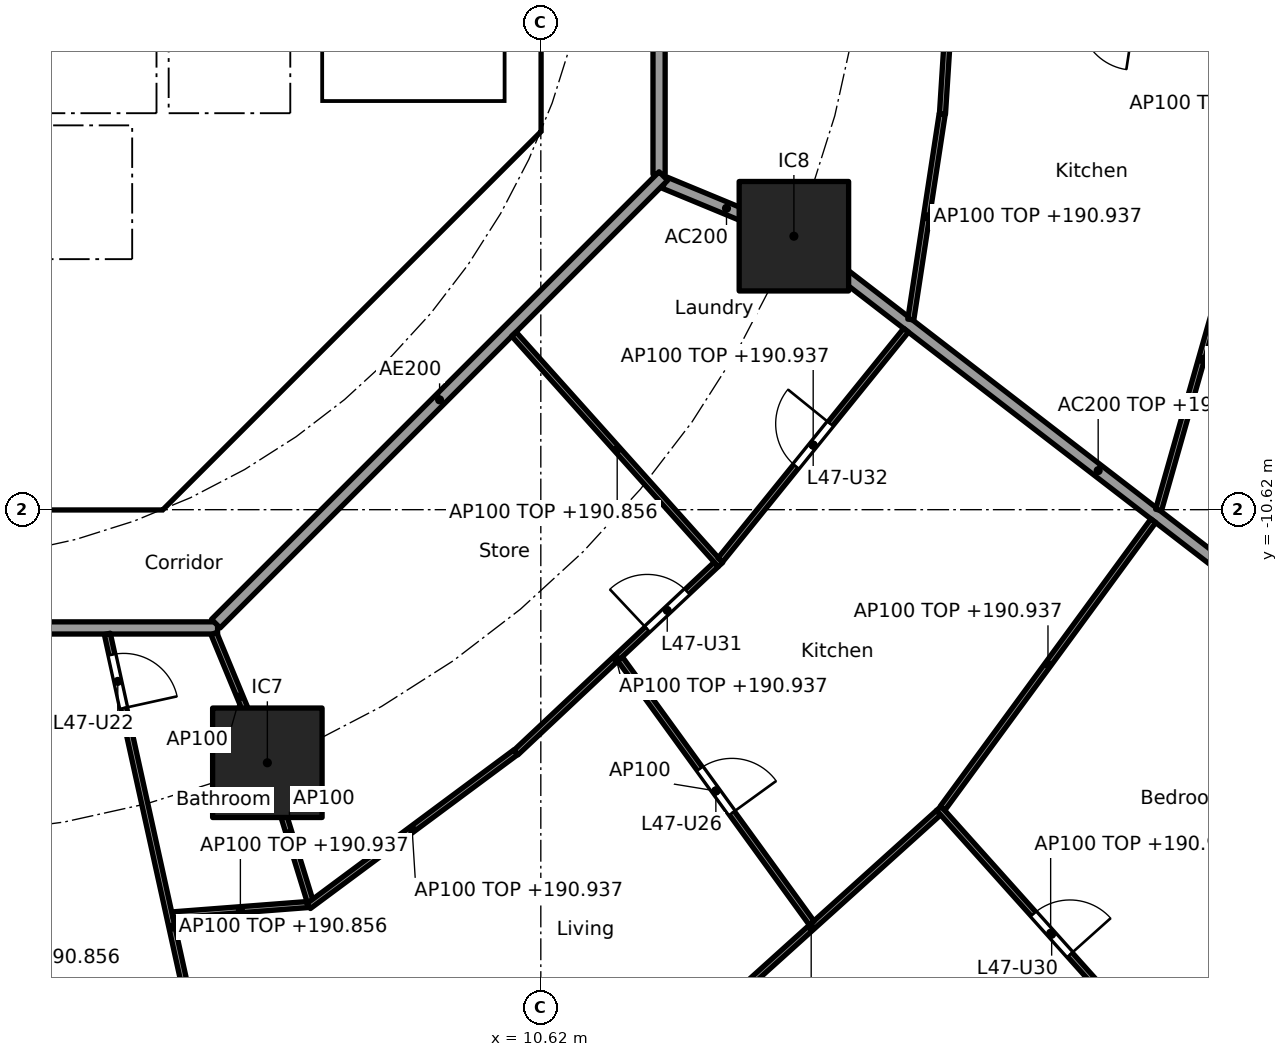
"""IFC4 building model, lengths in metres.
Left out: names, types, materials, properties, quantities, classifications, styles, units other than length and angle.
Written with IfcOpenShell. Run it as: python <this file> out.ifc"""

import sys

from ifc_helpers import new_model, si_unit, direction, frame, frame_2d, origin, origin_2d, place, context, subcontext, project, spatial, polyline, rectangle, outline, extrude, element, fill, save


model = new_model("IFC4")
c1 = context("Model", 3, precision=1e-05, world=origin(), true_north=direction((0.0, 1.0)))
c2 = subcontext(c1, "Body", "Model", "MODEL_VIEW")
j1 = project(units=[si_unit("LENGTHUNIT", "METRE"), si_unit("PLANEANGLEUNIT", "RADIAN")], contexts=[c1])
p1 = place(None, origin())
s1 = spatial("IfcSite", under=j1, at=p1, CompositionType="ELEMENT")
p2 = place(p1, origin())
s2 = spatial("IfcBuilding", under=s1, at=p2, CompositionType="ELEMENT")
p3 = place(p2, frame((0.0, 0.0, 188.1)))
s3 = spatial("IfcBuildingStorey", under=s2, at=p3, CompositionType="ELEMENT", Elevation=188.1)
for number, where, z_axis, x_axis in (
    (1, (6.123, -14.782, 0.0), (0.0, 0.0, 1.0), (1.0, 0.0, 0.0)),
    (2, (14.782, -6.123, 0.0), (0.0, 0.0, 1.0), (1.0, 0.0, 0.0)),
):
    element("IfcColumn", number, at=place(p3, frame(where, z_axis=z_axis, x_axis=x_axis)), inside=s3, PredefinedType="COLUMN", context=c2, shape_type="SweptSolid", body=[
        extrude(rectangle(XDim=1.8, YDim=1.8, at=origin_2d()), origin(), (0.0, 0.0, 1.0), 3.7),
    ])
p4 = place(p3, frame((4.613, -9.988, 0.0), z_axis=(0.0, 0.0, 1.0), x_axis=(0.707106781187, 0.707106781187, 0.0)))
e3 = element("IfcWall", 3, at=p4, inside=s3, PredefinedType="SHEAR", context=c2, shape_type="SweptSolid", body=[
    extrude(rectangle(XDim=7.602, YDim=0.6, at=frame_2d((3.801, 0.0))), origin(), (0.0, 0.0, 1.0), 3.44),
])
p5 = place(p4, frame((3.201, 0.0, 0.0)))
e4 = element("IfcOpeningElement", 4, at=p5, cuts=e3, PredefinedType="OPENING", context=c2, shape_type="SweptSolid", body=[
    extrude(rectangle(XDim=1.2, YDim=2.1, at=frame_2d((0.6, 1.05))), frame((0.0, 0.31, 0.0), z_axis=(0.0, -1.0, 0.0), x_axis=(1.0, 0.0, 0.0)), (0.0, 0.0, 1.0), 0.62),
])
p6 = place(p3, frame((4.0, -10.025, 0.0), z_axis=(0.0, 0.0, 1.0), x_axis=(0.0, 1.0, 0.0)))
e5 = element("IfcWall", 5, at=p6, inside=s3, PredefinedType="SOLIDWALL", context=c2, shape_type="SweptSolid", body=[
    extrude(rectangle(XDim=3.0, YDim=0.2, at=frame_2d((1.5, 0.0))), origin(), (0.0, 0.0, 1.0), 3.44),
])
p7 = place(p6, frame((0.975, 0.0, 0.0)))
e6 = element("IfcOpeningElement", 6, at=p7, cuts=e5, PredefinedType="OPENING", context=c2, shape_type="SweptSolid", body=[
    extrude(rectangle(XDim=1.1, YDim=2.1, at=frame_2d((0.55, 1.05))), frame((0.0, 0.11, 0.0), z_axis=(0.0, -1.0, 0.0), x_axis=(1.0, 0.0, 0.0)), (0.0, 0.0, 1.0), 0.22),
])
p8 = place(p3, frame((4.0, -6.5, 0.0), z_axis=(0.0, 0.0, 1.0), x_axis=(0.0, 1.0, 0.0)))
e7 = element("IfcWall", 7, at=p8, inside=s3, PredefinedType="SOLIDWALL", context=c2, shape_type="SweptSolid", body=[
    extrude(rectangle(XDim=2.2, YDim=0.2, at=frame_2d((1.1, 0.0))), origin(), (0.0, 0.0, 1.0), 3.44),
])
p9 = place(p8, frame((0.55, 0.0, 0.0)))
e8 = element("IfcOpeningElement", 8, at=p9, cuts=e7, PredefinedType="OPENING", context=c2, shape_type="SweptSolid", body=[
    extrude(rectangle(XDim=1.1, YDim=2.1, at=frame_2d((0.55, 1.05))), frame((0.0, 0.11, 0.0), z_axis=(0.0, -1.0, 0.0), x_axis=(1.0, 0.0, 0.0)), (0.0, 0.0, 1.0), 0.22),
])
p10 = place(p3, origin())
e9 = element("IfcWall", 9, at=p10, inside=s3, PredefinedType="SHEAR", context=c2, shape_type="SweptSolid", body=[
    extrude(outline(polyline([(-4.152, -10.025), (4.152, -10.025), (4.401, -9.776), (4.825, -10.2), (4.401, -10.625), (-4.401, -10.625), (-4.825, -10.2), (-4.401, -9.776), (-4.152, -10.025)])), origin(), (0.0, 0.0, 1.0), 3.44),
])
p11 = place(p3, origin())
e10 = element("IfcWall", 10, at=p11, inside=s3, PredefinedType="SHEAR", context=c2, shape_type="SweptSolid", body=[
    extrude(outline(polyline([(9.776, -4.401), (10.025, -4.152), (10.025, -3.801), (10.025, 4.152), (9.776, 4.401), (10.2, 4.825), (10.625, 4.401), (10.625, -4.401), (10.2, -4.825), (9.776, -4.401)])), origin(), (0.0, 0.0, 1.0), 3.44),
])
p12 = place(p3, origin())
e11 = element("IfcWall", 11, at=p12, inside=s3, PredefinedType="SOLIDWALL", context=c2, shape_type="SweptSolid", body=[
    extrude(outline(polyline([(-6.7, -2.1), (-6.5, -2.1), (-6.5, -4.1), (-2.3, -4.1), (-2.3, -2.1), (-2.1, -2.1), (-2.1, -4.1), (-0.1, -4.1), (-0.1, -2.1), (0.1, -2.1), (0.1, -4.1), (2.1, -4.1), (2.1, -2.1), (2.3, -2.1), (2.3, -4.1), (4.3, -4.1), (4.3, -2.1), (4.5, -2.1), (4.5, -4.1), (6.5, -4.1), (6.5, -2.1), (6.7, -2.1), (6.7, -4.3), (-6.7, -4.3), (-6.7, -2.1)])), origin(), (0.0, 0.0, 1.0), 3.44),
])
p13 = place(p3, origin())
e12 = element("IfcWall", 12, at=p13, inside=s3, PredefinedType="SOLIDWALL", context=c2, shape_type="SweptSolid", body=[
    extrude(outline(polyline([(4.1, -7.025), (-4.1, -7.025), (-4.1, -6.5), (4.1, -6.5), (4.1, -7.025)])), origin(), (0.0, 0.0, 1.0), 3.44),
])
p14 = place(p3, origin())
e13 = element("IfcWall", 13, at=p14, inside=s3, PredefinedType="SOLIDWALL", context=c2, shape_type="SweptSolid", body=[
    extrude(outline(polyline([(7.025, -3.9), (6.7, -3.9), (6.7, 3.9), (7.025, 3.9), (7.025, -3.9)])), origin(), (0.0, 0.0, 1.0), 3.44),
])
p15 = place(p3, origin())
e14 = element("IfcWall", 14, at=p15, inside=s3, PredefinedType="SOLIDWALL", context=c2, shape_type="SweptSolid", body=[
    extrude(outline(polyline([(10.025, -4.1), (6.7, -4.1), (6.7, -3.9), (10.025, -3.9), (10.025, -4.1)])), origin(), (0.0, 0.0, 1.0), 3.44),
])
p16 = place(p3, frame((12.657, -5.243, 0.0), z_axis=(0.0, 0.0, 1.0), x_axis=(0.92383017907, -0.382802560388, 0.0)))
e15 = element("IfcWall", 15, at=p16, inside=s3, PredefinedType="PARTITIONING", context=c2, shape_type="SweptSolid", body=[
    extrude(rectangle(XDim=2.2, YDim=0.2, at=frame_2d((1.1, 0.0))), origin(), (0.0, 0.0, 1.0), 3.44),
])
p17 = place(p3, frame((14.822, -6.154, 0.0), z_axis=(0.0, 0.0, 1.0), x_axis=(0.792203056092, -0.610257583254, 0.0)))
e16 = element("IfcWall", 16, at=p17, inside=s3, PredefinedType="PARTITIONING", context=c2, shape_type="SweptSolid", body=[
    extrude(rectangle(XDim=12.533, YDim=0.2, at=frame_2d((6.266, 0.0))), origin(), (0.0, 0.0, 1.0), 2.837),
])
p18 = place(p3, frame((12.565, -5.104, 0.0), z_axis=(0.0, 0.0, 1.0), x_axis=(0.0, 1.0, 0.0)))
e17 = element("IfcWall", 17, at=p18, inside=s3, PredefinedType="PARTITIONING", context=c2, shape_type="SweptSolid", body=[
    extrude(rectangle(XDim=10.209, YDim=0.2, at=frame_2d((5.104, 0.0))), origin(), (0.0, 0.0, 1.0), 3.44),
])
p19 = place(p3, frame((-5.104, -12.565, 0.0), z_axis=(0.0, 0.0, 1.0), x_axis=(1.0, 0.0, 0.0)))
e18 = element("IfcWall", 18, at=p19, inside=s3, PredefinedType="PARTITIONING", context=c2, shape_type="SweptSolid", body=[
    extrude(rectangle(XDim=10.409, YDim=0.2, at=frame_2d((5.205, 0.0))), origin(), (0.0, 0.0, 1.0), 3.44),
])
p20 = place(p19, frame((6.339, 0.0, 0.0)))
e19 = element("IfcOpeningElement", 19, at=p20, cuts=e18, PredefinedType="OPENING", context=c2, shape_type="SweptSolid", body=[
    extrude(rectangle(XDim=1.0, YDim=2.1, at=frame_2d((0.5, 1.05))), frame((0.0, 0.11, 0.0), z_axis=(0.0, -1.0, 0.0), x_axis=(1.0, 0.0, 0.0)), (0.0, 0.0, 1.0), 0.22),
])
p21 = place(p3, frame((5.275, -12.494, 0.0), z_axis=(0.0, 0.0, 1.0), x_axis=(0.707106781187, 0.707106781187, 0.0)))
e20 = element("IfcWall", 20, at=p21, inside=s3, PredefinedType="PARTITIONING", context=c2, shape_type="SweptSolid", body=[
    extrude(rectangle(XDim=10.409, YDim=0.2, at=frame_2d((5.205, 0.0))), origin(), (0.0, 0.0, 1.0), 3.44),
])
p22 = place(p3, frame((17.485, -0.05, 0.0), z_axis=(0.0, 0.0, 1.0), x_axis=(-0.063673473968, -0.997970785501, 0.0)))
e21 = element("IfcWall", 21, at=p22, inside=s3, PredefinedType="PARTITIONING", context=c2, shape_type="SweptSolid", body=[
    extrude(rectangle(XDim=4.072, YDim=0.1, at=frame_2d((2.036, 0.0))), origin(), (0.0, 0.0, 1.0), 2.837),
])
p23 = place(p22, frame((0.543, 0.0, 0.0)))
e22 = element("IfcOpeningElement", 22, at=p23, cuts=e21, PredefinedType="OPENING", context=c2, shape_type="SweptSolid", body=[
    extrude(rectangle(XDim=0.9, YDim=2.1, at=frame_2d((0.45, 1.05))), frame((0.0, 0.06, 0.0), z_axis=(0.0, -1.0, 0.0), x_axis=(1.0, 0.0, 0.0)), (0.0, 0.0, 1.0), 0.12),
])
p24 = place(p3, frame((3.491, -12.662, 0.0), z_axis=(0.0, 0.0, 1.0), x_axis=(0.215082442833, -0.976595895335, 0.0)))
e23 = element("IfcWall", 23, at=p24, inside=s3, PredefinedType="PARTITIONING", context=c2, shape_type="SweptSolid", body=[
    extrude(rectangle(XDim=9.878, YDim=0.1, at=frame_2d((4.939, 0.0))), origin(), (0.0, 0.0, 1.0), 2.756),
])
p25 = place(p24, frame((0.35, 0.0, 0.0)))
e24 = element("IfcOpeningElement", 24, at=p25, cuts=e23, PredefinedType="OPENING", context=c2, shape_type="SweptSolid", body=[
    extrude(rectangle(XDim=0.9, YDim=2.1, at=frame_2d((0.45, 1.05))), frame((0.0, 0.06, 0.0), z_axis=(0.0, -1.0, 0.0), x_axis=(1.0, 0.0, 0.0)), (0.0, 0.0, 1.0), 0.12),
])
p26 = place(p24, frame((6.861, 0.0, 0.0)))
e25 = element("IfcOpeningElement", 25, at=p26, cuts=e23, PredefinedType="OPENING", context=c2, shape_type="SweptSolid", body=[
    extrude(rectangle(XDim=0.9, YDim=2.1, at=frame_2d((0.45, 1.05))), frame((0.0, 0.06, 0.0), z_axis=(0.0, -1.0, 0.0), x_axis=(1.0, 0.0, 0.0)), (0.0, 0.0, 1.0), 0.12),
])
p27 = place(p3, frame((4.568, -17.284, 0.0), z_axis=(0.0, 0.0, 1.0), x_axis=(0.997076339393, 0.076411867029, 0.0)))
e26 = element("IfcWall", 26, at=p27, inside=s3, PredefinedType="PARTITIONING", context=c2, shape_type="SweptSolid", body=[
    extrude(rectangle(XDim=2.23, YDim=0.1, at=frame_2d((1.115, 0.0))), origin(), (0.0, 0.0, 1.0), 2.837),
])
p28 = place(p3, frame((5.243, -12.657, 0.0), z_axis=(0.0, 0.0, 1.0), x_axis=(0.382719158442, -0.923864733477, 0.0)))
e27 = element("IfcWall", 27, at=p28, inside=s3, PredefinedType="PARTITIONING", context=c2, shape_type="SweptSolid", body=[
    extrude(rectangle(XDim=2.25, YDim=0.1, at=frame_2d((1.125, 0.0))), origin(), (0.0, 0.0, 1.0), 3.44),
])
p29 = place(p3, frame((6.138, -14.83, 0.0), z_axis=(0.0, 0.0, 1.0), x_axis=(0.29476151767, -0.955570849127, 0.0)))
e28 = element("IfcWall", 28, at=p29, inside=s3, PredefinedType="PARTITIONING", context=c2, shape_type="SweptSolid", body=[
    extrude(rectangle(XDim=2.336, YDim=0.1, at=frame_2d((1.168, 0.0))), origin(), (0.0, 0.0, 1.0), 3.44),
])
p30 = place(p3, frame((6.801, -17.139, 0.0), z_axis=(0.0, 0.0, 1.0), x_axis=(0.802795005531, 0.596255129198, 0.0)))
e29 = element("IfcWall", 29, at=p30, inside=s3, PredefinedType="PARTITIONING", context=c2, shape_type="SweptSolid", body=[
    extrude(rectangle(XDim=4.242, YDim=0.1, at=frame_2d((2.121, 0.0))), origin(), (0.0, 0.0, 1.0), 2.837),
])
p31 = place(p3, frame((10.21, -14.614, 0.0), z_axis=(0.0, 0.0, 1.0), x_axis=(0.728883199496, 0.684638066055, 0.0)))
e30 = element("IfcWall", 30, at=p31, inside=s3, PredefinedType="PARTITIONING", context=c2, shape_type="SweptSolid", body=[
    extrude(rectangle(XDim=4.519, YDim=0.1, at=frame_2d((2.26, 0.0))), origin(), (0.0, 0.0, 1.0), 2.837),
])
p32 = place(p31, frame((2.964, 0.0, 0.0)))
e31 = element("IfcOpeningElement", 31, at=p32, cuts=e30, PredefinedType="OPENING", context=c2, shape_type="SweptSolid", body=[
    extrude(rectangle(XDim=0.9, YDim=2.1, at=frame_2d((0.45, 1.05))), frame((0.0, 0.06, 0.0), z_axis=(0.0, -1.0, 0.0), x_axis=(1.0, 0.0, 0.0)), (0.0, 0.0, 1.0), 0.12),
])
p33 = place(p3, frame((12.971, -19.38, 0.0), z_axis=(0.0, 0.0, 1.0), x_axis=(0.742768881471, 0.669547898748, 0.0)))
e32 = element("IfcWall", 32, at=p33, inside=s3, PredefinedType="PARTITIONING", context=c2, shape_type="SweptSolid", body=[
    extrude(rectangle(XDim=5.642, YDim=0.1, at=frame_2d((2.821, 0.0))), origin(), (0.0, 0.0, 1.0), 2.837),
])
p34 = place(p3, frame((11.923, -13.073, 0.0), z_axis=(0.0, 0.0, 1.0), x_axis=(0.587178522891, -0.809457461672, 0.0)))
e33 = element("IfcWall", 33, at=p34, inside=s3, PredefinedType="PARTITIONING", context=c2, shape_type="SweptSolid", body=[
    extrude(rectangle(XDim=5.366, YDim=0.1, at=frame_2d((2.683, 0.0))), origin(), (0.0, 0.0, 1.0), 3.44),
])
p35 = place(p34, frame((2.233, 0.0, 0.0)))
e34 = element("IfcOpeningElement", 34, at=p35, cuts=e33, PredefinedType="OPENING", context=c2, shape_type="SweptSolid", body=[
    extrude(rectangle(XDim=0.9, YDim=2.1, at=frame_2d((0.45, 1.05))), frame((0.0, 0.06, 0.0), z_axis=(0.0, -1.0, 0.0), x_axis=(1.0, 0.0, 0.0)), (0.0, 0.0, 1.0), 0.12),
])
p36 = place(p3, frame((10.178, -7.732, 0.0), z_axis=(0.0, 0.0, 1.0), x_axis=(0.667285466359, -0.744802058527, 0.0)))
e35 = element("IfcWall", 35, at=p36, inside=s3, PredefinedType="PARTITIONING", context=c2, shape_type="SweptSolid", body=[
    extrude(rectangle(XDim=5.09, YDim=0.1, at=frame_2d((2.545, 0.0))), origin(), (0.0, 0.0, 1.0), 2.756),
])
p37 = place(p3, frame((13.572, -11.447, 0.0), z_axis=(0.0, 0.0, 1.0), x_axis=(0.628738316533, 0.777616955399, 0.0)))
e36 = element("IfcWall", 36, at=p37, inside=s3, PredefinedType="PARTITIONING", context=c2, shape_type="SweptSolid", body=[
    extrude(rectangle(XDim=4.857, YDim=0.1, at=frame_2d((2.429, 0.0))), origin(), (0.0, 0.0, 1.0), 2.837),
])
p38 = place(p37, frame((1.979, 0.0, 0.0)))
e37 = element("IfcOpeningElement", 37, at=p38, cuts=e36, PredefinedType="OPENING", context=c2, shape_type="SweptSolid", body=[
    extrude(rectangle(XDim=0.9, YDim=2.1, at=frame_2d((0.45, 1.05))), frame((0.0, 0.06, 0.0), z_axis=(0.0, -1.0, 0.0), x_axis=(1.0, 0.0, 0.0)), (0.0, 0.0, 1.0), 0.12),
])
p39 = place(p3, frame((17.166, -15.532, 0.0), z_axis=(0.0, 0.0, 1.0), x_axis=(0.66728415915, -0.744803229684, 0.0)))
e38 = element("IfcWall", 38, at=p39, inside=s3, PredefinedType="PARTITIONING", context=c2, shape_type="SweptSolid", body=[
    extrude(rectangle(XDim=5.511, YDim=0.1, at=frame_2d((2.756, 0.0))), origin(), (0.0, 0.0, 1.0), 2.837),
])
p40 = place(p39, frame((2.331, 0.0, 0.0)))
e39 = element("IfcOpeningElement", 39, at=p40, cuts=e38, PredefinedType="OPENING", context=c2, shape_type="SweptSolid", body=[
    extrude(rectangle(XDim=0.9, YDim=2.1, at=frame_2d((0.45, 1.05))), frame((0.0, 0.06, 0.0), z_axis=(0.0, -1.0, 0.0), x_axis=(1.0, 0.0, 0.0)), (0.0, 0.0, 1.0), 0.12),
])
p41 = place(p3, frame((17.229, -15.529, 0.0), z_axis=(0.0, 0.0, 1.0), x_axis=(0.591110768293, 0.806590391468, 0.0)))
e40 = element("IfcWall", 40, at=p41, inside=s3, PredefinedType="PARTITIONING", context=c2, shape_type="SweptSolid", body=[
    extrude(rectangle(XDim=5.86, YDim=0.1, at=frame_2d((2.93, 0.0))), origin(), (0.0, 0.0, 1.0), 2.837),
])
p42 = place(p3, frame((16.704, -7.493, 0.0), z_axis=(0.0, 0.0, 1.0), x_axis=(0.1510806336, 0.988521442434, 0.0)))
e41 = element("IfcWall", 41, at=p42, inside=s3, PredefinedType="PARTITIONING", context=c2, shape_type="SweptSolid", body=[
    extrude(rectangle(XDim=3.419, YDim=0.1, at=frame_2d((1.71, 0.0))), origin(), (0.0, 0.0, 1.0), 2.837),
])
p43 = place(p3, frame((20.779, -10.625, 0.0), z_axis=(0.0, 0.0, 1.0), x_axis=(0.273819702124, 0.961781040949, 0.0)))
e42 = element("IfcWall", 42, at=p43, inside=s3, PredefinedType="PARTITIONING", context=c2, shape_type="SweptSolid", body=[
    extrude(rectangle(XDim=5.152, YDim=0.1, at=frame_2d((2.576, 0.0))), origin(), (0.0, 0.0, 1.0), 2.837),
])
p44 = place(p3, frame((17.407, -2.039, 0.0), z_axis=(0.0, 0.0, 1.0), x_axis=(0.98858728603, -0.150649188184, 0.0)))
e43 = element("IfcWall", 43, at=p44, inside=s3, PredefinedType="PARTITIONING", context=c2, shape_type="SweptSolid", body=[
    extrude(rectangle(XDim=11.441, YDim=0.1, at=frame_2d((5.721, 0.0))), origin(), (0.0, 0.0, 1.0), 2.905),
])
p45 = place(p44, frame((7.832, 0.0, 0.0)))
e44 = element("IfcOpeningElement", 44, at=p45, cuts=e43, PredefinedType="OPENING", context=c2, shape_type="SweptSolid", body=[
    extrude(rectangle(XDim=0.9, YDim=2.1, at=frame_2d((0.45, 1.05))), frame((0.0, 0.06, 0.0), z_axis=(0.0, -1.0, 0.0), x_axis=(1.0, 0.0, 0.0)), (0.0, 0.0, 1.0), 0.12),
])
p46 = place(p44, frame((2.111, 0.0, 0.0)))
e45 = element("IfcOpeningElement", 45, at=p46, cuts=e43, PredefinedType="OPENING", context=c2, shape_type="SweptSolid", body=[
    extrude(rectangle(XDim=0.9, YDim=2.1, at=frame_2d((0.45, 1.05))), frame((0.0, 0.06, 0.0), z_axis=(0.0, -1.0, 0.0), x_axis=(1.0, 0.0, 0.0)), (0.0, 0.0, 1.0), 0.12),
])
p47 = place(p9, origin())
e46 = element("IfcDoor", 46, at=p47, inside=s3, OperationType="DOUBLE_DOOR_SLIDING", PredefinedType="DOOR", context=c2, shape_type="SweptSolid", body=[
    extrude(rectangle(XDim=1.1, YDim=2.1, at=frame_2d((0.55, 1.05))), frame((0.0, 0.025, 0.0), z_axis=(0.0, -1.0, 0.0), x_axis=(1.0, 0.0, 0.0)), (0.0, 0.0, 1.0), 0.05),
])
fill(e8, e46)
p48 = place(p7, origin())
e47 = element("IfcDoor", 47, at=p48, inside=s3, OperationType="SINGLE_SWING_LEFT", PredefinedType="DOOR", context=c2, shape_type="SweptSolid", body=[
    extrude(rectangle(XDim=1.1, YDim=2.1, at=frame_2d((0.55, 1.05))), frame((0.0, 0.025, 0.0), z_axis=(0.0, -1.0, 0.0), x_axis=(1.0, 0.0, 0.0)), (0.0, 0.0, 1.0), 0.05),
])
fill(e6, e47)
p49 = place(p5, origin())
e48 = element("IfcDoor", 48, at=p49, inside=s3, OperationType="SINGLE_SWING_RIGHT", PredefinedType="DOOR", context=c2, shape_type="SweptSolid", body=[
    extrude(rectangle(XDim=1.2, YDim=2.1, at=frame_2d((0.6, 1.05))), frame((0.0, 0.025, 0.0), z_axis=(0.0, -1.0, 0.0), x_axis=(1.0, 0.0, 0.0)), (0.0, 0.0, 1.0), 0.05),
])
fill(e4, e48)
p50 = place(p25, origin())
e49 = element("IfcDoor", 49, at=p50, inside=s3, OperationType="SINGLE_SWING_RIGHT", PredefinedType="DOOR", context=c2, shape_type="SweptSolid", body=[
    extrude(rectangle(XDim=0.9, YDim=2.1, at=frame_2d((0.45, 1.05))), frame((0.0, 0.025, 0.0), z_axis=(0.0, -1.0, 0.0), x_axis=(1.0, 0.0, 0.0)), (0.0, 0.0, 1.0), 0.05),
])
fill(e24, e49)
p51 = place(p35, origin())
e50 = element("IfcDoor", 50, at=p51, inside=s3, OperationType="SINGLE_SWING_RIGHT", PredefinedType="DOOR", context=c2, shape_type="SweptSolid", body=[
    extrude(rectangle(XDim=0.9, YDim=2.1, at=frame_2d((0.45, 1.05))), frame((0.0, 0.025, 0.0), z_axis=(0.0, -1.0, 0.0), x_axis=(1.0, 0.0, 0.0)), (0.0, 0.0, 1.0), 0.05),
])
fill(e34, e50)
p52 = place(p40, origin())
e51 = element("IfcDoor", 51, at=p52, inside=s3, OperationType="SINGLE_SWING_RIGHT", PredefinedType="DOOR", context=c2, shape_type="SweptSolid", body=[
    extrude(rectangle(XDim=0.9, YDim=2.1, at=frame_2d((0.45, 1.05))), frame((0.0, 0.025, 0.0), z_axis=(0.0, -1.0, 0.0), x_axis=(1.0, 0.0, 0.0)), (0.0, 0.0, 1.0), 0.05),
])
fill(e39, e51)
p53 = place(p32, origin())
e52 = element("IfcDoor", 52, at=p53, inside=s3, OperationType="SINGLE_SWING_LEFT", PredefinedType="DOOR", context=c2, shape_type="SweptSolid", body=[
    extrude(rectangle(XDim=0.9, YDim=2.1, at=frame_2d((0.45, 1.05))), frame((0.0, 0.025, 0.0), z_axis=(0.0, -1.0, 0.0), x_axis=(1.0, 0.0, 0.0)), (0.0, 0.0, 1.0), 0.05),
])
fill(e31, e52)
p54 = place(p38, origin())
e53 = element("IfcDoor", 53, at=p54, inside=s3, OperationType="SINGLE_SWING_RIGHT", PredefinedType="DOOR", context=c2, shape_type="SweptSolid", body=[
    extrude(rectangle(XDim=0.9, YDim=2.1, at=frame_2d((0.45, 1.05))), frame((0.0, 0.025, 0.0), z_axis=(0.0, -1.0, 0.0), x_axis=(1.0, 0.0, 0.0)), (0.0, 0.0, 1.0), 0.05),
])
fill(e37, e53)
save(model, sys.argv[1])
